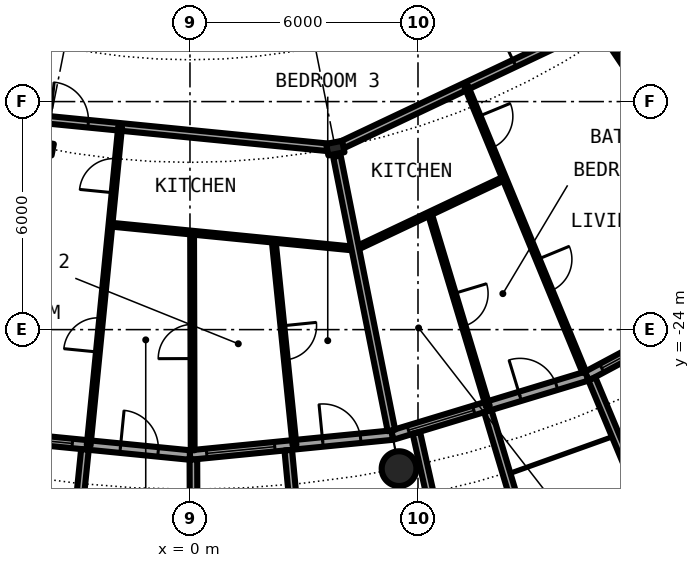
"""IFC4 building model, lengths in metres.
Left out: names, types, materials, properties, quantities, classifications, styles, units other than length and angle.
Written with IfcOpenShell. Run it as: python <this file> out.ifc"""

import sys

from ifc_helpers import new_model, si_unit, direction, frame, frame_2d, origin, origin_2d, place, context, subcontext, project, spatial, rectangle, hollow_circle, i_section, extrude, element, fill, save


model = new_model("IFC4")
c1 = context("Model", 3, precision=1e-05, world=origin(), true_north=direction((0.0, 1.0)))
c2 = subcontext(c1, "Body", "Model", "MODEL_VIEW")
j1 = project(units=[si_unit("LENGTHUNIT", "METRE"), si_unit("PLANEANGLEUNIT", "RADIAN")], contexts=[c1])
p1 = place(None, origin())
s1 = spatial("IfcSite", under=j1, at=p1, CompositionType="ELEMENT")
p2 = place(p1, origin())
s2 = spatial("IfcBuilding", under=s1, at=p2, CompositionType="ELEMENT")
p3 = place(p2, frame((0.0, 0.0, 111.65)))
s3 = spatial("IfcBuildingStorey", under=s2, at=p3, CompositionType="ELEMENT", Elevation=111.65)
p4 = place(p3, frame((5.501, -27.658, 0.0), z_axis=(0.0, 0.0, 1.0), x_axis=(1.0, 0.0, 0.0)))
e1 = element("IfcColumn", 1, at=p4, inside=s3, PredefinedType="COLUMN", context=c2, shape_type="SweptSolid", body=[
    extrude(hollow_circle(Radius=0.457, WallThickness=0.04, at=origin_2d()), origin(), (0.0, 0.0, 1.0), 3.05),
])
for number, where, z_axis, x_axis in (
    (2, (-3.824, -19.223, 0.0), (0.0, 0.0, 1.0), (-0.195, -0.981, 0.0)),
    (3, (3.824, -19.223, 0.0), (0.0, 0.0, 1.0), (0.195, -0.981, 0.0)),
):
    element("IfcColumn", number, at=place(p3, frame(where, z_axis=z_axis, x_axis=x_axis)), inside=s3, PredefinedType="COLUMN", context=c2, shape_type="SweptSolid", body=[
        extrude(i_section(OverallWidth=0.307, OverallDepth=0.432, WebThickness=0.021, FlangeThickness=0.04, FilletRadius=0.027, at=origin_2d()), origin(), (0.0, 0.0, 1.0), 3.05),
    ])
p5 = place(p3, frame((-5.326, -26.775, 0.0), z_axis=(0.0, 0.0, 1.0), x_axis=(0.995173996315, -0.098126026407, 0.0)))
e4 = element("IfcWall", 4, at=p5, inside=s3, PredefinedType="SOLIDWALL", context=c2, shape_type="SweptSolid", body=[
    extrude(rectangle(XDim=5.352, YDim=0.25, at=frame_2d((2.676, 0.0))), origin(), (0.0, 0.0, 1.0), 2.7),
])
p6 = place(p5, frame((0.441, 0.0, 0.3)))
e5 = element("IfcOpeningElement", 5, at=p6, cuts=e4, PredefinedType="OPENING", context=c2, shape_type="SweptSolid", body=[
    extrude(rectangle(XDim=1.8, YDim=2.1, at=frame_2d((0.9, 1.05))), frame((0.0, 0.135, 0.0), z_axis=(0.0, -1.0, 0.0), x_axis=(1.0, 0.0, 0.0)), (0.0, 0.0, 1.0), 0.27),
])
p7 = place(p5, frame((3.51, 0.0, 0.0)))
e6 = element("IfcOpeningElement", 6, at=p7, cuts=e4, PredefinedType="OPENING", context=c2, shape_type="SweptSolid", body=[
    extrude(rectangle(XDim=1.0, YDim=2.2, at=frame_2d((0.5, 1.1))), frame((0.0, 0.135, 0.0), z_axis=(0.0, -1.0, 0.0), x_axis=(1.0, 0.0, 0.0)), (0.0, 0.0, 1.0), 0.27),
])
p8 = place(p3, frame((-2.764, -27.153, -0.03), z_axis=(0.0, 0.0, 1.0), x_axis=(-0.101505487237, -0.994834979311, 0.0)))
e7 = element("IfcWall", 7, at=p8, inside=s3, PredefinedType="SOLIDWALL", context=c2, shape_type="SweptSolid", body=[
    extrude(rectangle(XDim=3.007, YDim=0.2, at=frame_2d((1.503, 0.0))), origin(), (0.0, 0.0, 1.0), 2.73),
])
p9 = place(p3, frame((0.0, -27.3, 0.0), z_axis=(0.0, 0.0, 1.0), x_axis=(0.995173996315, 0.098126026407, 0.0)))
e8 = element("IfcWall", 8, at=p9, inside=s3, PredefinedType="SOLIDWALL", context=c2, shape_type="SweptSolid", body=[
    extrude(rectangle(XDim=5.352, YDim=0.25, at=frame_2d((2.676, 0.0))), origin(), (0.0, 0.0, 1.0), 2.7),
])
p10 = place(p9, frame((0.441, 0.0, 0.3)))
e9 = element("IfcOpeningElement", 9, at=p10, cuts=e8, PredefinedType="OPENING", context=c2, shape_type="SweptSolid", body=[
    extrude(rectangle(XDim=1.8, YDim=2.1, at=frame_2d((0.9, 1.05))), frame((0.0, 0.135, 0.0), z_axis=(0.0, -1.0, 0.0), x_axis=(1.0, 0.0, 0.0)), (0.0, 0.0, 1.0), 0.27),
])
p11 = place(p9, frame((3.51, 0.0, 0.0)))
e10 = element("IfcOpeningElement", 10, at=p11, cuts=e8, PredefinedType="OPENING", context=c2, shape_type="SweptSolid", body=[
    extrude(rectangle(XDim=1.0, YDim=2.2, at=frame_2d((0.5, 1.1))), frame((0.0, 0.135, 0.0), z_axis=(0.0, -1.0, 0.0), x_axis=(1.0, 0.0, 0.0)), (0.0, 0.0, 1.0), 0.27),
])
p12 = place(p3, frame((0.09, -27.417, -0.03), z_axis=(0.0, 0.0, 1.0), x_axis=(0.00347308367, -0.999993968827, 0.0)))
e11 = element("IfcWall", 11, at=p12, inside=s3, PredefinedType="SOLIDWALL", context=c2, shape_type="SweptSolid", body=[
    extrude(rectangle(XDim=2.882, YDim=0.2, at=frame_2d((1.441, 0.0))), origin(), (0.0, 0.0, 1.0), 2.73),
])
p13 = place(p3, frame((2.586, -27.171, -0.03), z_axis=(0.0, 0.0, 1.0), x_axis=(0.094548432284, -0.995520262954, 0.0)))
e12 = element("IfcWall", 12, at=p13, inside=s3, PredefinedType="SOLIDWALL", context=c2, shape_type="SweptSolid", body=[
    extrude(rectangle(XDim=3.006, YDim=0.2, at=frame_2d((1.503, 0.0))), origin(), (0.0, 0.0, 1.0), 2.73),
])
p14 = place(p3, frame((5.326, -26.775, 0.0), z_axis=(0.0, 0.0, 1.0), x_axis=(0.956965678721, 0.290201119486, 0.0)))
e13 = element("IfcWall", 13, at=p14, inside=s3, PredefinedType="SOLIDWALL", context=c2, shape_type="SweptSolid", body=[
    extrude(rectangle(XDim=5.351, YDim=0.25, at=frame_2d((2.676, 0.0))), origin(), (0.0, 0.0, 1.0), 2.7),
])
p15 = place(p14, frame((0.441, 0.0, 0.3)))
e14 = element("IfcOpeningElement", 14, at=p15, cuts=e13, PredefinedType="OPENING", context=c2, shape_type="SweptSolid", body=[
    extrude(rectangle(XDim=1.8, YDim=2.1, at=frame_2d((0.9, 1.05))), frame((0.0, 0.135, 0.0), z_axis=(0.0, -1.0, 0.0), x_axis=(1.0, 0.0, 0.0)), (0.0, 0.0, 1.0), 0.27),
])
p16 = place(p14, frame((3.51, 0.0, 0.0)))
e15 = element("IfcOpeningElement", 15, at=p16, cuts=e13, PredefinedType="OPENING", context=c2, shape_type="SweptSolid", body=[
    extrude(rectangle(XDim=1.0, YDim=2.2, at=frame_2d((0.5, 1.1))), frame((0.0, 0.135, 0.0), z_axis=(0.0, -1.0, 0.0), x_axis=(1.0, 0.0, 0.0)), (0.0, 0.0, 1.0), 0.27),
])
p17 = place(p3, frame((5.957, -26.715, -0.03), z_axis=(0.0, 0.0, 1.0), x_axis=(0.217857287091, -0.975980636315, 0.0)))
e16 = element("IfcWall", 16, at=p17, inside=s3, PredefinedType="SOLIDWALL", context=c2, shape_type="SweptSolid", body=[
    extrude(rectangle(XDim=2.928, YDim=0.2, at=frame_2d((1.464, 0.0))), origin(), (0.0, 0.0, 1.0), 2.73),
])
p18 = place(p3, frame((7.837, -26.144, -0.03), z_axis=(0.0, 0.0, 1.0), x_axis=(0.287064767992, -0.957911174889, 0.0)))
e17 = element("IfcWall", 17, at=p18, inside=s3, PredefinedType="SOLIDWALL", context=c2, shape_type="SweptSolid", body=[
    extrude(rectangle(XDim=3.006, YDim=0.2, at=frame_2d((1.503, 0.0))), origin(), (0.0, 0.0, 1.0), 2.73),
])
p19 = place(p3, frame((10.447, -25.222, 0.0), z_axis=(0.0, 0.0, 1.0), x_axis=(0.881915646801, 0.471407246368, 0.0)))
e18 = element("IfcWall", 18, at=p19, inside=s3, PredefinedType="SOLIDWALL", context=c2, shape_type="SweptSolid", body=[
    extrude(rectangle(XDim=5.352, YDim=0.25, at=frame_2d((2.676, 0.0))), origin(), (0.0, 0.0, 1.0), 2.7),
])
p20 = place(p19, frame((0.441, 0.0, 0.3)))
e19 = element("IfcOpeningElement", 19, at=p20, cuts=e18, PredefinedType="OPENING", context=c2, shape_type="SweptSolid", body=[
    extrude(rectangle(XDim=1.8, YDim=2.1, at=frame_2d((0.9, 1.05))), frame((0.0, 0.135, 0.0), z_axis=(0.0, -1.0, 0.0), x_axis=(1.0, 0.0, 0.0)), (0.0, 0.0, 1.0), 0.27),
])
p21 = place(p19, frame((3.51, 0.0, 0.0)))
e20 = element("IfcOpeningElement", 20, at=p21, cuts=e18, PredefinedType="OPENING", context=c2, shape_type="SweptSolid", body=[
    extrude(rectangle(XDim=1.0, YDim=2.2, at=frame_2d((0.5, 1.1))), frame((0.0, 0.135, 0.0), z_axis=(0.0, -1.0, 0.0), x_axis=(1.0, 0.0, 0.0)), (0.0, 0.0, 1.0), 0.27),
])
p22 = place(p3, frame((10.575, -25.295, -0.03), z_axis=(0.0, 0.0, 1.0), x_axis=(0.385697364644, -0.922625353492, 0.0)))
e21 = element("IfcWall", 21, at=p22, inside=s3, PredefinedType="SOLIDWALL", context=c2, shape_type="SweptSolid", body=[
    extrude(rectangle(XDim=2.883, YDim=0.2, at=frame_2d((1.442, 0.0))), origin(), (0.0, 0.0, 1.0), 2.73),
])
p23 = place(p3, frame((4.352, -21.873, 0.0), z_axis=(0.0, 0.0, 1.0), x_axis=(0.903905215872, 0.427732814639, 0.0)))
e22 = element("IfcWall", 22, at=p23, inside=s3, PredefinedType="PARTITIONING", context=c2, shape_type="SweptSolid", body=[
    extrude(rectangle(XDim=4.334, YDim=0.1, at=frame_2d((2.167, 0.0))), origin(), (0.0, 0.0, 1.0), 2.7),
])
p24 = place(p3, frame((-2.092, -21.237, 0.0), z_axis=(0.0, 0.0, 1.0), x_axis=(0.995182772405, -0.098036980306, 0.0)))
e23 = element("IfcWall", 23, at=p24, inside=s3, PredefinedType="PARTITIONING", context=c2, shape_type="SweptSolid", body=[
    extrude(rectangle(XDim=6.477, YDim=0.1, at=frame_2d((3.239, 0.0))), origin(), (0.0, 0.0, 1.0), 2.7),
])
p25 = place(p3, frame((3.967, -19.155, 0.0), z_axis=(0.0, 0.0, 1.0), x_axis=(0.904003983145, 0.427524032609, 0.0)))
e24 = element("IfcWall", 24, at=p25, inside=s3, PredefinedType="PARTITIONING", context=c2, shape_type="SweptSolid", body=[
    extrude(rectangle(XDim=9.37, YDim=0.2, at=frame_2d((4.685, 0.0))), origin(), (0.0, 0.0, 1.0), 2.39),
])
p26 = place(p25, frame((5.056, 0.0, 0.0)))
e25 = element("IfcOpeningElement", 25, at=p26, cuts=e24, PredefinedType="OPENING", context=c2, shape_type="SweptSolid", body=[
    extrude(rectangle(XDim=1.0, YDim=2.3, at=frame_2d((0.5, 1.15))), frame((0.0, 0.11, 0.0), z_axis=(0.0, -1.0, 0.0), x_axis=(1.0, 0.0, 0.0)), (0.0, 0.0, 1.0), 0.22),
])
p27 = place(p3, frame((-7.501, -18.108, 0.0), z_axis=(0.0, 0.0, 1.0), x_axis=(0.995189414306, -0.097969534313, 0.0)))
e26 = element("IfcWall", 26, at=p27, inside=s3, PredefinedType="PARTITIONING", context=c2, shape_type="SweptSolid", body=[
    extrude(rectangle(XDim=11.219, YDim=0.2, at=frame_2d((5.609, 0.0))), origin(), (0.0, 0.0, 1.0), 2.39),
])
p28 = place(p27, frame((3.847, 0.0, 0.0)))
e27 = element("IfcOpeningElement", 27, at=p28, cuts=e26, PredefinedType="OPENING", context=c2, shape_type="SweptSolid", body=[
    extrude(rectangle(XDim=1.0, YDim=2.3, at=frame_2d((0.5, 1.15))), frame((0.0, 0.11, 0.0), z_axis=(0.0, -1.0, 0.0), x_axis=(1.0, 0.0, 0.0)), (0.0, 0.0, 1.0), 0.22),
])
p29 = place(p3, frame((-2.666, -27.044, 0.0), z_axis=(0.0, 0.0, 1.0), x_axis=(0.098366640075, 0.995150241984, 0.0)))
e28 = element("IfcWall", 28, at=p29, inside=s3, PredefinedType="PARTITIONING", context=c2, shape_type="SweptSolid", body=[
    extrude(rectangle(XDim=8.419, YDim=0.1, at=frame_2d((4.209, 0.0))), origin(), (0.0, 0.0, 1.0), 2.7),
])
p30 = place(p29, frame((6.677, 0.0, 0.0)))
e29 = element("IfcOpeningElement", 29, at=p30, cuts=e28, PredefinedType="OPENING", context=c2, shape_type="SweptSolid", body=[
    extrude(rectangle(XDim=0.9, YDim=2.3, at=frame_2d((0.45, 1.15))), frame((0.0, 0.06, 0.0), z_axis=(0.0, -1.0, 0.0), x_axis=(1.0, 0.0, 0.0)), (0.0, 0.0, 1.0), 0.12),
])
p31 = place(p29, frame((2.466, 0.0, 0.0)))
e30 = element("IfcOpeningElement", 30, at=p31, cuts=e28, PredefinedType="OPENING", context=c2, shape_type="SweptSolid", body=[
    extrude(rectangle(XDim=0.9, YDim=2.3, at=frame_2d((0.45, 1.15))), frame((0.0, 0.06, 0.0), z_axis=(0.0, -1.0, 0.0), x_axis=(1.0, 0.0, 0.0)), (0.0, 0.0, 1.0), 0.12),
])
p32 = place(p3, frame((0.071, -27.175, 0.0), z_axis=(0.0, 0.0, 1.0), x_axis=(-0.002643463093, 0.999996506045, 0.0)))
e31 = element("IfcWall", 31, at=p32, inside=s3, PredefinedType="PARTITIONING", context=c2, shape_type="SweptSolid", body=[
    extrude(rectangle(XDim=5.726, YDim=0.1, at=frame_2d((2.863, 0.0))), origin(), (0.0, 0.0, 1.0), 2.7),
])
p33 = place(p32, frame((2.413, 0.0, 0.0)))
e32 = element("IfcOpeningElement", 32, at=p33, cuts=e31, PredefinedType="OPENING", context=c2, shape_type="SweptSolid", body=[
    extrude(rectangle(XDim=0.9, YDim=2.3, at=frame_2d((0.45, 1.15))), frame((0.0, 0.06, 0.0), z_axis=(0.0, -1.0, 0.0), x_axis=(1.0, 0.0, 0.0)), (0.0, 0.0, 1.0), 0.12),
])
p34 = place(p3, frame((2.203, -21.66, 0.0), z_axis=(0.0, 0.0, 1.0), x_axis=(0.101248136141, -0.994861203851, 0.0)))
e33 = element("IfcWall", 33, at=p34, inside=s3, PredefinedType="PARTITIONING", context=c2, shape_type="SweptSolid", body=[
    extrude(rectangle(XDim=5.404, YDim=0.1, at=frame_2d((2.702, 0.0))), origin(), (0.0, 0.0, 1.0), 2.7),
])
p35 = place(p34, frame((2.252, 0.0, 0.0)))
e34 = element("IfcOpeningElement", 34, at=p35, cuts=e33, PredefinedType="OPENING", context=c2, shape_type="SweptSolid", body=[
    extrude(rectangle(XDim=0.9, YDim=2.3, at=frame_2d((0.45, 1.15))), frame((0.0, 0.06, 0.0), z_axis=(0.0, -1.0, 0.0), x_axis=(1.0, 0.0, 0.0)), (0.0, 0.0, 1.0), 0.12),
])
p36 = place(p3, frame((3.866, -19.435, 0.0), z_axis=(0.0, 0.0, 1.0), x_axis=(0.194999559373, -0.98080332985, 0.0)))
e35 = element("IfcWall", 35, at=p36, inside=s3, PredefinedType="PARTITIONING", context=c2, shape_type="SweptSolid", body=[
    extrude(rectangle(XDim=7.359, YDim=0.2, at=frame_2d((3.68, 0.0))), origin(), (0.0, 0.0, 1.0), 2.7),
])
p37 = place(p3, frame((6.31, -20.945, 0.0), z_axis=(0.0, 0.0, 1.0), x_axis=(0.288484435279, -0.957484585047, 0.0)))
e36 = element("IfcWall", 36, at=p37, inside=s3, PredefinedType="PARTITIONING", context=c2, shape_type="SweptSolid", body=[
    extrude(rectangle(XDim=5.3, YDim=0.1, at=frame_2d((2.65, 0.0))), origin(), (0.0, 0.0, 1.0), 2.7),
])
p38 = place(p37, frame((2.2, 0.0, 0.0)))
e37 = element("IfcOpeningElement", 37, at=p38, cuts=e36, PredefinedType="OPENING", context=c2, shape_type="SweptSolid", body=[
    extrude(rectangle(XDim=0.9, YDim=2.3, at=frame_2d((0.45, 1.15))), frame((0.0, 0.06, 0.0), z_axis=(0.0, -1.0, 0.0), x_axis=(1.0, 0.0, 0.0)), (0.0, 0.0, 1.0), 0.12),
])
p39 = place(p3, frame((7.268, -17.594, 0.0), z_axis=(0.0, 0.0, 1.0), x_axis=(0.381763497026, -0.924260045841, 0.0)))
e38 = element("IfcWall", 38, at=p39, inside=s3, PredefinedType="PARTITIONING", context=c2, shape_type="SweptSolid", body=[
    extrude(rectangle(XDim=8.138, YDim=0.1, at=frame_2d((4.069, 0.0))), origin(), (0.0, 0.0, 1.0), 2.7),
])
p40 = place(p39, frame((0.861, 0.0, 0.0)))
e39 = element("IfcOpeningElement", 39, at=p40, cuts=e38, PredefinedType="OPENING", context=c2, shape_type="SweptSolid", body=[
    extrude(rectangle(XDim=0.9, YDim=2.3, at=frame_2d((0.45, 1.15))), frame((0.0, 0.06, 0.0), z_axis=(0.0, -1.0, 0.0), x_axis=(1.0, 0.0, 0.0)), (0.0, 0.0, 1.0), 0.12),
])
p41 = place(p39, frame((4.93, 0.0, 0.0)))
e40 = element("IfcOpeningElement", 40, at=p41, cuts=e38, PredefinedType="OPENING", context=c2, shape_type="SweptSolid", body=[
    extrude(rectangle(XDim=0.9, YDim=2.3, at=frame_2d((0.45, 1.15))), frame((0.0, 0.06, 0.0), z_axis=(0.0, -1.0, 0.0), x_axis=(1.0, 0.0, 0.0)), (0.0, 0.0, 1.0), 0.12),
])
p42 = place(p3, frame((11.041, -16.455, 0.0), z_axis=(0.0, 0.0, 1.0), x_axis=(0.557051175603, -0.830478168141, 0.0)))
e41 = element("IfcWall", 41, at=p42, inside=s3, PredefinedType="PARTITIONING", context=c2, shape_type="SweptSolid", body=[
    extrude(rectangle(XDim=2.059, YDim=0.1, at=frame_2d((1.03, 0.0))), origin(), (0.0, 0.0, 1.0), 2.7),
])
p43 = place(p42, frame((0.46, 0.0, 0.0)))
e42 = element("IfcOpeningElement", 42, at=p43, cuts=e41, PredefinedType="OPENING", context=c2, shape_type="SweptSolid", body=[
    extrude(rectangle(XDim=0.9, YDim=2.3, at=frame_2d((0.45, 1.15))), frame((0.0, 0.06, 0.0), z_axis=(0.0, -1.0, 0.0), x_axis=(1.0, 0.0, 0.0)), (0.0, 0.0, 1.0), 0.12),
])
p44 = place(p6, origin())
e43 = element("IfcWindow", 43, at=p44, inside=s3, PartitioningType="SINGLE_PANEL", PredefinedType="WINDOW", context=c2, shape_type="SweptSolid", body=[
    extrude(rectangle(XDim=1.8, YDim=2.1, at=frame_2d((0.9, 1.05))), frame((0.0, 0.03, 0.0), z_axis=(0.0, -1.0, 0.0), x_axis=(1.0, 0.0, 0.0)), (0.0, 0.0, 1.0), 0.06),
])
fill(e5, e43)
p45 = place(p7, origin())
e44 = element("IfcDoor", 44, at=p45, inside=s3, OperationType="SINGLE_SWING_LEFT", PredefinedType="DOOR", context=c2, shape_type="SweptSolid", body=[
    extrude(rectangle(XDim=1.0, YDim=2.2, at=frame_2d((0.5, 1.1))), frame((0.0, 0.025, 0.0), z_axis=(0.0, -1.0, 0.0), x_axis=(1.0, 0.0, 0.0)), (0.0, 0.0, 1.0), 0.05),
])
fill(e6, e44)
p46 = place(p10, origin())
e45 = element("IfcWindow", 45, at=p46, inside=s3, PartitioningType="SINGLE_PANEL", PredefinedType="WINDOW", context=c2, shape_type="SweptSolid", body=[
    extrude(rectangle(XDim=1.8, YDim=2.1, at=frame_2d((0.9, 1.05))), frame((0.0, 0.03, 0.0), z_axis=(0.0, -1.0, 0.0), x_axis=(1.0, 0.0, 0.0)), (0.0, 0.0, 1.0), 0.06),
])
fill(e9, e45)
p47 = place(p11, origin())
e46 = element("IfcDoor", 46, at=p47, inside=s3, OperationType="SINGLE_SWING_LEFT", PredefinedType="DOOR", context=c2, shape_type="SweptSolid", body=[
    extrude(rectangle(XDim=1.0, YDim=2.2, at=frame_2d((0.5, 1.1))), frame((0.0, 0.025, 0.0), z_axis=(0.0, -1.0, 0.0), x_axis=(1.0, 0.0, 0.0)), (0.0, 0.0, 1.0), 0.05),
])
fill(e10, e46)
p48 = place(p15, origin())
e47 = element("IfcWindow", 47, at=p48, inside=s3, PartitioningType="SINGLE_PANEL", PredefinedType="WINDOW", context=c2, shape_type="SweptSolid", body=[
    extrude(rectangle(XDim=1.8, YDim=2.1, at=frame_2d((0.9, 1.05))), frame((0.0, 0.03, 0.0), z_axis=(0.0, -1.0, 0.0), x_axis=(1.0, 0.0, 0.0)), (0.0, 0.0, 1.0), 0.06),
])
fill(e14, e47)
p49 = place(p16, origin())
e48 = element("IfcDoor", 48, at=p49, inside=s3, OperationType="SINGLE_SWING_LEFT", PredefinedType="DOOR", context=c2, shape_type="SweptSolid", body=[
    extrude(rectangle(XDim=1.0, YDim=2.2, at=frame_2d((0.5, 1.1))), frame((0.0, 0.025, 0.0), z_axis=(0.0, -1.0, 0.0), x_axis=(1.0, 0.0, 0.0)), (0.0, 0.0, 1.0), 0.05),
])
fill(e15, e48)
p50 = place(p20, origin())
e49 = element("IfcWindow", 49, at=p50, inside=s3, PartitioningType="SINGLE_PANEL", PredefinedType="WINDOW", context=c2, shape_type="SweptSolid", body=[
    extrude(rectangle(XDim=1.8, YDim=2.1, at=frame_2d((0.9, 1.05))), frame((0.0, 0.03, 0.0), z_axis=(0.0, -1.0, 0.0), x_axis=(1.0, 0.0, 0.0)), (0.0, 0.0, 1.0), 0.06),
])
fill(e19, e49)
p51 = place(p28, origin())
e50 = element("IfcDoor", 50, at=p51, inside=s3, OperationType="SINGLE_SWING_LEFT", PredefinedType="DOOR", context=c2, shape_type="SweptSolid", body=[
    extrude(rectangle(XDim=1.0, YDim=2.3, at=frame_2d((0.5, 1.15))), frame((0.0, 0.025, 0.0), z_axis=(0.0, -1.0, 0.0), x_axis=(1.0, 0.0, 0.0)), (0.0, 0.0, 1.0), 0.05),
])
fill(e27, e50)
p52 = place(p30, origin())
e51 = element("IfcDoor", 51, at=p52, inside=s3, OperationType="SINGLE_SWING_RIGHT", PredefinedType="DOOR", context=c2, shape_type="SweptSolid", body=[
    extrude(rectangle(XDim=0.9, YDim=2.3, at=frame_2d((0.45, 1.15))), frame((0.0, 0.025, 0.0), z_axis=(0.0, -1.0, 0.0), x_axis=(1.0, 0.0, 0.0)), (0.0, 0.0, 1.0), 0.05),
])
fill(e29, e51)
p53 = place(p31, origin())
e52 = element("IfcDoor", 52, at=p53, inside=s3, OperationType="SINGLE_SWING_LEFT", PredefinedType="DOOR", context=c2, shape_type="SweptSolid", body=[
    extrude(rectangle(XDim=0.9, YDim=2.3, at=frame_2d((0.45, 1.15))), frame((0.0, 0.025, 0.0), z_axis=(0.0, -1.0, 0.0), x_axis=(1.0, 0.0, 0.0)), (0.0, 0.0, 1.0), 0.05),
])
fill(e30, e52)
p54 = place(p33, origin())
e53 = element("IfcDoor", 53, at=p54, inside=s3, OperationType="SINGLE_SWING_RIGHT", PredefinedType="DOOR", context=c2, shape_type="SweptSolid", body=[
    extrude(rectangle(XDim=0.9, YDim=2.3, at=frame_2d((0.45, 1.15))), frame((0.0, 0.025, 0.0), z_axis=(0.0, -1.0, 0.0), x_axis=(1.0, 0.0, 0.0)), (0.0, 0.0, 1.0), 0.05),
])
fill(e32, e53)
p55 = place(p35, origin())
e54 = element("IfcDoor", 54, at=p55, inside=s3, OperationType="SINGLE_SWING_LEFT", PredefinedType="DOOR", context=c2, shape_type="SweptSolid", body=[
    extrude(rectangle(XDim=0.9, YDim=2.3, at=frame_2d((0.45, 1.15))), frame((0.0, 0.025, 0.0), z_axis=(0.0, -1.0, 0.0), x_axis=(1.0, 0.0, 0.0)), (0.0, 0.0, 1.0), 0.05),
])
fill(e34, e54)
p56 = place(p26, origin())
e55 = element("IfcDoor", 55, at=p56, inside=s3, OperationType="SINGLE_SWING_RIGHT", PredefinedType="DOOR", context=c2, shape_type="SweptSolid", body=[
    extrude(rectangle(XDim=1.0, YDim=2.3, at=frame_2d((0.5, 1.15))), frame((0.0, 0.025, 0.0), z_axis=(0.0, -1.0, 0.0), x_axis=(1.0, 0.0, 0.0)), (0.0, 0.0, 1.0), 0.05),
])
fill(e25, e55)
p57 = place(p43, origin())
e56 = element("IfcDoor", 56, at=p57, inside=s3, OperationType="SINGLE_SWING_LEFT", PredefinedType="DOOR", context=c2, shape_type="SweptSolid", body=[
    extrude(rectangle(XDim=0.9, YDim=2.3, at=frame_2d((0.45, 1.15))), frame((0.0, 0.025, 0.0), z_axis=(0.0, -1.0, 0.0), x_axis=(1.0, 0.0, 0.0)), (0.0, 0.0, 1.0), 0.05),
])
fill(e42, e56)
p58 = place(p40, origin())
e57 = element("IfcDoor", 57, at=p58, inside=s3, OperationType="SINGLE_SWING_LEFT", PredefinedType="DOOR", context=c2, shape_type="SweptSolid", body=[
    extrude(rectangle(XDim=0.9, YDim=2.3, at=frame_2d((0.45, 1.15))), frame((0.0, 0.025, 0.0), z_axis=(0.0, -1.0, 0.0), x_axis=(1.0, 0.0, 0.0)), (0.0, 0.0, 1.0), 0.05),
])
fill(e39, e57)
p59 = place(p41, origin())
e58 = element("IfcDoor", 58, at=p59, inside=s3, OperationType="SINGLE_SWING_RIGHT", PredefinedType="DOOR", context=c2, shape_type="SweptSolid", body=[
    extrude(rectangle(XDim=0.9, YDim=2.3, at=frame_2d((0.45, 1.15))), frame((0.0, 0.025, 0.0), z_axis=(0.0, -1.0, 0.0), x_axis=(1.0, 0.0, 0.0)), (0.0, 0.0, 1.0), 0.05),
])
fill(e40, e58)
p60 = place(p38, origin())
e59 = element("IfcDoor", 59, at=p60, inside=s3, OperationType="SINGLE_SWING_RIGHT", PredefinedType="DOOR", context=c2, shape_type="SweptSolid", body=[
    extrude(rectangle(XDim=0.9, YDim=2.3, at=frame_2d((0.45, 1.15))), frame((0.0, 0.025, 0.0), z_axis=(0.0, -1.0, 0.0), x_axis=(1.0, 0.0, 0.0)), (0.0, 0.0, 1.0), 0.05),
])
fill(e37, e59)
save(model, sys.argv[1])
